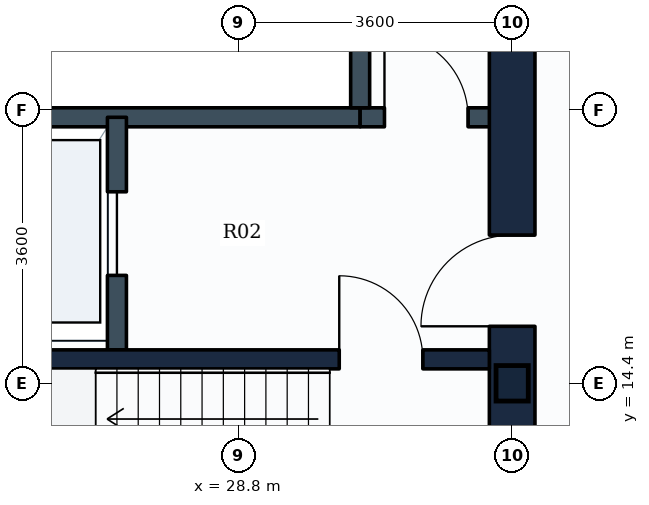
"""IFC4 building model, lengths in metres.
Left out: names, types, materials, properties, quantities, classifications, styles, units other than length and angle.
Written with IfcOpenShell. Run it as: python <this file> out.ifc"""

import sys

from ifc_helpers import new_model, si_unit, direction, frame, frame_2d, origin, origin_2d, place, context, subcontext, project, spatial, rectangle, i_section, extrude, element, fill, save


model = new_model("IFC4")
c1 = context("Model", 3, precision=1e-05, world=origin(), true_north=direction((0.0, 1.0)))
c2 = subcontext(c1, "Body", "Model", "MODEL_VIEW")
j1 = project(units=[si_unit("LENGTHUNIT", "METRE"), si_unit("PLANEANGLEUNIT", "RADIAN")], contexts=[c1])
p1 = place(None, origin())
s1 = spatial("IfcSite", under=j1, at=p1, CompositionType="ELEMENT")
p2 = place(p1, origin())
s2 = spatial("IfcBuilding", under=s1, at=p2, CompositionType="ELEMENT")
p3 = place(p2, frame((0.0, 0.0, 39.6)))
s3 = spatial("IfcBuildingStorey", under=s2, at=p3, CompositionType="ELEMENT", Elevation=39.6)
p4 = place(p3, frame((32.4, 14.4, 0.0), z_axis=(0.0, 0.0, 1.0), x_axis=(1.0, 0.0, 0.0)))
e1 = element("IfcColumn", 1, at=p4, inside=s3, PredefinedType="COLUMN", context=c2, shape_type="SweptSolid", body=[
    extrude(i_section(OverallWidth=0.424, OverallDepth=0.467, WebThickness=0.033, FlangeThickness=0.053, FilletRadius=0.015, at=origin_2d()), origin(), (0.0, 0.0, 1.0), 3.9),
])
p5 = place(p3, frame((32.4, 10.8, 0.0), z_axis=(0.0, 0.0, 1.0), x_axis=(0.0, 1.0, 0.0)))
e2 = element("IfcWall", 2, at=p5, inside=s3, PredefinedType="SHEAR", context=c2, shape_type="SweptSolid", body=[
    extrude(rectangle(XDim=14.4, YDim=0.6, at=frame_2d((7.2, 0.0))), origin(), (0.0, 0.0, 1.0), 3.65),
])
p6 = place(p5, frame((4.35, 0.0, 0.0)))
e3 = element("IfcOpeningElement", 3, at=p6, cuts=e2, PredefinedType="OPENING", context=c2, shape_type="SweptSolid", body=[
    extrude(rectangle(XDim=1.2, YDim=2.1, at=frame_2d((0.6, 1.05))), frame((0.0, 0.31, 0.0), z_axis=(0.0, -1.0, 0.0), x_axis=(1.0, 0.0, 0.0)), (0.0, 0.0, 1.0), 0.62),
])
p7 = place(p5, frame((10.0, 0.0, 0.0)))
e4 = element("IfcOpeningElement", 4, at=p7, cuts=e2, PredefinedType="OPENING", context=c2, shape_type="SweptSolid", body=[
    extrude(rectangle(XDim=1.2, YDim=2.1, at=frame_2d((0.6, 1.05))), frame((0.0, 0.31, 0.0), z_axis=(0.0, -1.0, 0.0), x_axis=(1.0, 0.0, 0.0)), (0.0, 0.0, 1.0), 0.62),
])
p8 = place(p3, frame((23.35, 14.715, 0.0), z_axis=(0.0, 0.0, 1.0), x_axis=(1.0, 0.0, 0.0)))
e5 = element("IfcWall", 5, at=p8, inside=s3, PredefinedType="SHEAR", context=c2, shape_type="SweptSolid", body=[
    extrude(rectangle(XDim=8.75, YDim=0.25, at=frame_2d((4.375, 0.0))), origin(), (0.0, 0.0, 1.0), 3.65),
])
p9 = place(p8, frame((6.775, 0.0, 0.0)))
e6 = element("IfcOpeningElement", 6, at=p9, cuts=e5, PredefinedType="OPENING", context=c2, shape_type="SweptSolid", body=[
    extrude(rectangle(XDim=1.1, YDim=2.1, at=frame_2d((0.55, 1.05))), frame((0.0, 0.135, 0.0), z_axis=(0.0, -1.0, 0.0), x_axis=(1.0, 0.0, 0.0)), (0.0, 0.0, 1.0), 0.27),
])
p10 = place(p3, frame((21.88, 17.9, 0.0), z_axis=(0.0, 0.0, 1.0), x_axis=(1.0, 0.0, 0.0)))
e7 = element("IfcWall", 7, at=p10, inside=s3, PredefinedType="PARTITIONING", context=c2, shape_type="SweptSolid", body=[
    extrude(rectangle(XDim=8.52, YDim=0.25, at=frame_2d((4.26, 0.0))), origin(), (0.0, 0.0, 1.0), 3.635),
])
p11 = place(p3, frame((30.4, 17.9, 0.0), z_axis=(0.0, 0.0, 1.0), x_axis=(1.0, 0.0, 0.0)))
e8 = element("IfcWall", 8, at=p11, inside=s3, PredefinedType="PARTITIONING", context=c2, shape_type="SweptSolid", body=[
    extrude(rectangle(XDim=1.75, YDim=0.25, at=frame_2d((0.875, 0.0))), origin(), (0.0, 0.0, 1.0), 3.635),
])
p12 = place(p11, frame((0.32, 0.0, 0.0)))
e9 = element("IfcOpeningElement", 9, at=p12, cuts=e8, PredefinedType="OPENING", context=c2, shape_type="SweptSolid", body=[
    extrude(rectangle(XDim=1.1, YDim=2.1, at=frame_2d((0.55, 1.05))), frame((0.0, 0.135, 0.0), z_axis=(0.0, -1.0, 0.0), x_axis=(1.0, 0.0, 0.0)), (0.0, 0.0, 1.0), 0.27),
])
p13 = place(p3, frame((27.2, 14.84, 0.0), z_axis=(0.0, 0.0, 1.0), x_axis=(0.0, 1.0, 0.0)))
e10 = element("IfcWall", 10, at=p13, inside=s3, PredefinedType="PARTITIONING", context=c2, shape_type="SweptSolid", body=[
    extrude(rectangle(XDim=3.06, YDim=0.25, at=frame_2d((1.53, 0.0))), origin(), (0.0, 0.0, 1.0), 3.635),
])
p14 = place(p13, frame((0.98, 0.0, 0.0)))
e11 = element("IfcOpeningElement", 11, at=p14, cuts=e10, PredefinedType="OPENING", context=c2, shape_type="SweptSolid", body=[
    extrude(rectangle(XDim=1.1, YDim=2.1, at=frame_2d((0.55, 1.05))), frame((0.0, 0.135, 0.0), z_axis=(0.0, -1.0, 0.0), x_axis=(1.0, 0.0, 0.0)), (0.0, 0.0, 1.0), 0.27),
])
p15 = place(p3, frame((30.4, 18.025, 0.0), z_axis=(0.0, 0.0, 1.0), x_axis=(0.0, 1.0, 0.0)))
e12 = element("IfcWall", 12, at=p15, inside=s3, PredefinedType="PARTITIONING", context=c2, shape_type="SweptSolid", body=[
    extrude(rectangle(XDim=2.27, YDim=0.25, at=frame_2d((1.135, 0.0))), origin(), (0.0, 0.0, 1.0), 3.635),
])
p16 = place(p9, origin())
e13 = element("IfcDoor", 13, at=p16, inside=s3, OperationType="SINGLE_SWING_LEFT", PredefinedType="DOOR", context=c2, shape_type="SweptSolid", body=[
    extrude(rectangle(XDim=1.1, YDim=2.1, at=frame_2d((0.55, 1.05))), frame((0.0, 0.025, 0.0), z_axis=(0.0, -1.0, 0.0), x_axis=(1.0, 0.0, 0.0)), (0.0, 0.0, 1.0), 0.05),
])
fill(e6, e13)
p17 = place(p14, origin())
e14 = element("IfcDoor", 14, at=p17, inside=s3, OperationType="SLIDING_TO_LEFT", PredefinedType="DOOR", context=c2, shape_type="SweptSolid", body=[
    extrude(rectangle(XDim=1.1, YDim=2.1, at=frame_2d((0.55, 1.05))), frame((0.0, 0.025, 0.0), z_axis=(0.0, -1.0, 0.0), x_axis=(1.0, 0.0, 0.0)), (0.0, 0.0, 1.0), 0.05),
])
fill(e11, e14)
p18 = place(p6, origin())
e15 = element("IfcDoor", 15, at=p18, inside=s3, OperationType="SINGLE_SWING_LEFT", PredefinedType="DOOR", context=c2, shape_type="SweptSolid", body=[
    extrude(rectangle(XDim=1.2, YDim=2.1, at=frame_2d((0.6, 1.05))), frame((0.0, 0.025, 0.0), z_axis=(0.0, -1.0, 0.0), x_axis=(1.0, 0.0, 0.0)), (0.0, 0.0, 1.0), 0.05),
])
fill(e3, e15)
p19 = place(p12, origin())
e16 = element("IfcDoor", 16, at=p19, inside=s3, OperationType="SINGLE_SWING_LEFT", PredefinedType="DOOR", context=c2, shape_type="SweptSolid", body=[
    extrude(rectangle(XDim=1.1, YDim=2.1, at=frame_2d((0.55, 1.05))), frame((0.0, 0.025, 0.0), z_axis=(0.0, -1.0, 0.0), x_axis=(1.0, 0.0, 0.0)), (0.0, 0.0, 1.0), 0.05),
])
fill(e9, e16)
save(model, sys.argv[1])
